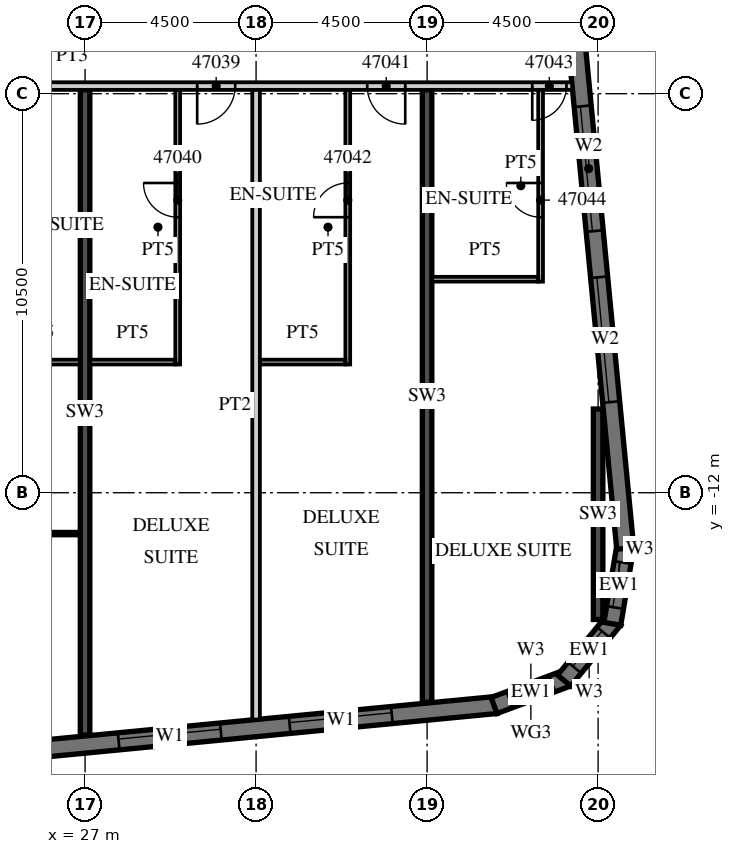
"""IFC4 building model, lengths in metres.
Left out: names, types, materials, properties, quantities, classifications, styles, units other than length and angle.
Written with IfcOpenShell. Run it as: python <this file> out.ifc"""

import sys

from ifc_helpers import new_model, si_unit, direction, frame, frame_2d, origin, place, context, subcontext, project, spatial, polyline, rectangle, outline, extrude, element, fill, save


model = new_model("IFC4")
c1 = context("Model", 3, precision=1e-05, world=origin(), true_north=direction((0.0, 1.0)))
c2 = subcontext(c1, "Body", "Model", "MODEL_VIEW")
j1 = project(units=[si_unit("LENGTHUNIT", "METRE"), si_unit("PLANEANGLEUNIT", "RADIAN")], contexts=[c1])
p1 = place(None, origin())
s1 = spatial("IfcSite", under=j1, at=p1, CompositionType="ELEMENT")
p2 = place(p1, origin())
s2 = spatial("IfcBuilding", under=s1, at=p2, CompositionType="ELEMENT")
p3 = place(p2, frame((0.0, 0.0, 196.6)))
s3 = spatial("IfcBuildingStorey", under=s2, at=p3, CompositionType="ELEMENT", Elevation=196.6)
p4 = place(p3, frame((27.0, -18.379, 0.0), z_axis=(0.0, 0.0, 1.0), x_axis=(0.0, 1.0, 0.0)))
e1 = element("IfcWall", 1, at=p4, inside=s3, PredefinedType="SHEAR", context=c2, shape_type="SweptSolid", body=[
    extrude(rectangle(XDim=16.979, YDim=0.25, at=frame_2d((8.489, 0.0))), origin(), (0.0, 0.0, 1.0), 3.3),
])
p5 = place(p3, frame((36.0, -17.512, 0.0), z_axis=(0.0, 0.0, 1.0), x_axis=(0.0, 1.0, 0.0)))
e2 = element("IfcWall", 2, at=p5, inside=s3, PredefinedType="SHEAR", context=c2, shape_type="SweptSolid", body=[
    extrude(rectangle(XDim=16.112, YDim=0.25, at=frame_2d((8.056, 0.0))), origin(), (0.0, 0.0, 1.0), 3.3),
])
p6 = place(p3, frame((40.5, -15.335, 0.0), z_axis=(0.0, 0.0, 1.0), x_axis=(0.0, 1.0, 0.0)))
e3 = element("IfcWall", 3, at=p6, inside=s3, PredefinedType="SHEAR", context=c2, shape_type="SweptSolid", body=[
    extrude(rectangle(XDim=5.538, YDim=0.25, at=frame_2d((2.769, 0.0))), origin(), (0.0, 0.0, 1.0), 3.3),
])
p7 = place(p3, frame((-13.521, -22.529, 0.0), z_axis=(0.0, 0.0, 1.0), x_axis=(0.995396436651, 0.095843277819, 0.0)))
e4 = element("IfcWall", 4, at=p7, inside=s3, PredefinedType="SOLIDWALL", context=c2, shape_type="SweptSolid", body=[
    extrude(rectangle(XDim=51.578, YDim=0.45, at=frame_2d((25.789, 0.0))), origin(), (0.0, 0.0, 1.0), 3.02),
])
p8 = place(p7, frame((0.91, 0.0, 0.45)))
e5 = element("IfcOpeningElement", 5, at=p8, cuts=e4, PredefinedType="OPENING", context=c2, shape_type="SweptSolid", body=[
    extrude(rectangle(XDim=2.7, YDim=2.25, at=frame_2d((1.35, 1.125))), frame((0.0, 0.235, 0.0), z_axis=(0.0, -1.0, 0.0), x_axis=(1.0, 0.0, 0.0)), (0.0, 0.0, 1.0), 0.47),
])
p9 = place(p7, frame((5.431, 0.0, 0.45)))
e6 = element("IfcOpeningElement", 6, at=p9, cuts=e4, PredefinedType="OPENING", context=c2, shape_type="SweptSolid", body=[
    extrude(rectangle(XDim=2.7, YDim=2.25, at=frame_2d((1.35, 1.125))), frame((0.0, 0.235, 0.0), z_axis=(0.0, -1.0, 0.0), x_axis=(1.0, 0.0, 0.0)), (0.0, 0.0, 1.0), 0.47),
])
p10 = place(p7, frame((9.952, 0.0, 0.45)))
e7 = element("IfcOpeningElement", 7, at=p10, cuts=e4, PredefinedType="OPENING", context=c2, shape_type="SweptSolid", body=[
    extrude(rectangle(XDim=2.7, YDim=2.25, at=frame_2d((1.35, 1.125))), frame((0.0, 0.235, 0.0), z_axis=(0.0, -1.0, 0.0), x_axis=(1.0, 0.0, 0.0)), (0.0, 0.0, 1.0), 0.47),
])
p11 = place(p7, frame((14.473, 0.0, 0.45)))
e8 = element("IfcOpeningElement", 8, at=p11, cuts=e4, PredefinedType="OPENING", context=c2, shape_type="SweptSolid", body=[
    extrude(rectangle(XDim=2.7, YDim=2.25, at=frame_2d((1.35, 1.125))), frame((0.0, 0.235, 0.0), z_axis=(0.0, -1.0, 0.0), x_axis=(1.0, 0.0, 0.0)), (0.0, 0.0, 1.0), 0.47),
])
p12 = place(p7, frame((18.994, 0.0, 0.45)))
e9 = element("IfcOpeningElement", 9, at=p12, cuts=e4, PredefinedType="OPENING", context=c2, shape_type="SweptSolid", body=[
    extrude(rectangle(XDim=2.7, YDim=2.25, at=frame_2d((1.35, 1.125))), frame((0.0, 0.235, 0.0), z_axis=(0.0, -1.0, 0.0), x_axis=(1.0, 0.0, 0.0)), (0.0, 0.0, 1.0), 0.47),
])
p13 = place(p7, frame((23.514, 0.0, 0.45)))
e10 = element("IfcOpeningElement", 10, at=p13, cuts=e4, PredefinedType="OPENING", context=c2, shape_type="SweptSolid", body=[
    extrude(rectangle(XDim=2.7, YDim=2.25, at=frame_2d((1.35, 1.125))), frame((0.0, 0.235, 0.0), z_axis=(0.0, -1.0, 0.0), x_axis=(1.0, 0.0, 0.0)), (0.0, 0.0, 1.0), 0.47),
])
p14 = place(p7, frame((28.035, 0.0, 0.45)))
e11 = element("IfcOpeningElement", 11, at=p14, cuts=e4, PredefinedType="OPENING", context=c2, shape_type="SweptSolid", body=[
    extrude(rectangle(XDim=2.7, YDim=2.25, at=frame_2d((1.35, 1.125))), frame((0.0, 0.235, 0.0), z_axis=(0.0, -1.0, 0.0), x_axis=(1.0, 0.0, 0.0)), (0.0, 0.0, 1.0), 0.47),
])
p15 = place(p7, frame((32.556, 0.0, 0.45)))
e12 = element("IfcOpeningElement", 12, at=p15, cuts=e4, PredefinedType="OPENING", context=c2, shape_type="SweptSolid", body=[
    extrude(rectangle(XDim=2.7, YDim=2.25, at=frame_2d((1.35, 1.125))), frame((0.0, 0.235, 0.0), z_axis=(0.0, -1.0, 0.0), x_axis=(1.0, 0.0, 0.0)), (0.0, 0.0, 1.0), 0.47),
])
p16 = place(p7, frame((37.077, 0.0, 0.45)))
e13 = element("IfcOpeningElement", 13, at=p16, cuts=e4, PredefinedType="OPENING", context=c2, shape_type="SweptSolid", body=[
    extrude(rectangle(XDim=2.7, YDim=2.25, at=frame_2d((1.35, 1.125))), frame((0.0, 0.235, 0.0), z_axis=(0.0, -1.0, 0.0), x_axis=(1.0, 0.0, 0.0)), (0.0, 0.0, 1.0), 0.47),
])
p17 = place(p7, frame((41.598, 0.0, 0.45)))
e14 = element("IfcOpeningElement", 14, at=p17, cuts=e4, PredefinedType="OPENING", context=c2, shape_type="SweptSolid", body=[
    extrude(rectangle(XDim=2.7, YDim=2.25, at=frame_2d((1.35, 1.125))), frame((0.0, 0.235, 0.0), z_axis=(0.0, -1.0, 0.0), x_axis=(1.0, 0.0, 0.0)), (0.0, 0.0, 1.0), 0.47),
])
p18 = place(p7, frame((46.119, 0.0, 0.45)))
e15 = element("IfcOpeningElement", 15, at=p18, cuts=e4, PredefinedType="OPENING", context=c2, shape_type="SweptSolid", body=[
    extrude(rectangle(XDim=2.7, YDim=2.25, at=frame_2d((1.35, 1.125))), frame((0.0, 0.235, 0.0), z_axis=(0.0, -1.0, 0.0), x_axis=(1.0, 0.0, 0.0)), (0.0, 0.0, 1.0), 0.47),
])
p19 = place(p3, frame((37.761, -17.598, 0.0), z_axis=(0.0, 0.0, 1.0), x_axis=(0.936677599948, 0.350192909346, 0.0)))
e16 = element("IfcWall", 16, at=p19, inside=s3, PredefinedType="SOLIDWALL", context=c2, shape_type="SweptSolid", body=[
    extrude(outline(polyline([(0.0, -0.225), (2.071, -0.225), (1.95, 0.225), (0.121, 0.225), (0.0, -0.225)])), origin(), (0.0, 0.0, 1.0), 3.02),
])
p20 = place(p19, frame((0.435, 0.0, 0.45)))
e17 = element("IfcOpeningElement", 17, at=p20, cuts=e16, PredefinedType="OPENING", context=c2, shape_type="SweptSolid", body=[
    extrude(rectangle(XDim=1.2, YDim=2.25, at=frame_2d((0.6, 1.125))), frame((0.0, 0.235, 0.0), z_axis=(0.0, -1.0, 0.0), x_axis=(1.0, 0.0, 0.0)), (0.0, 0.0, 1.0), 0.47),
])
p21 = place(p3, frame((39.606, -16.941, 0.0), z_axis=(0.0, 0.0, 1.0), x_axis=(0.636116318187, 0.771593176315, 0.0)))
e18 = element("IfcWall", 18, at=p21, inside=s3, PredefinedType="SOLIDWALL", context=c2, shape_type="SweptSolid", body=[
    extrude(outline(polyline([(0.0, -0.225), (2.071, -0.225), (1.95, 0.225), (0.121, 0.225), (0.0, -0.225)])), origin(), (0.0, 0.0, 1.0), 3.02),
])
p22 = place(p21, frame((0.435, 0.0, 0.45)))
e19 = element("IfcOpeningElement", 19, at=p22, cuts=e18, PredefinedType="OPENING", context=c2, shape_type="SweptSolid", body=[
    extrude(rectangle(XDim=1.2, YDim=2.25, at=frame_2d((0.6, 1.125))), frame((0.0, 0.235, 0.0), z_axis=(0.0, -1.0, 0.0), x_axis=(1.0, 0.0, 0.0)), (0.0, 0.0, 1.0), 0.47),
])
p23 = place(p3, frame((40.875, -15.449, 0.0), z_axis=(0.0, 0.0, 1.0), x_axis=(0.164953448126, 0.986301353518, 0.0)))
e20 = element("IfcWall", 20, at=p23, inside=s3, PredefinedType="SOLIDWALL", context=c2, shape_type="SweptSolid", body=[
    extrude(outline(polyline([(0.0, -0.225), (2.071, -0.225), (1.95, 0.225), (0.121, 0.225), (0.0, -0.225)])), origin(), (0.0, 0.0, 1.0), 3.02),
])
p24 = place(p23, frame((0.435, 0.0, 0.45)))
e21 = element("IfcOpeningElement", 21, at=p24, cuts=e20, PredefinedType="OPENING", context=c2, shape_type="SweptSolid", body=[
    extrude(rectangle(XDim=1.2, YDim=2.25, at=frame_2d((0.6, 1.125))), frame((0.0, 0.235, 0.0), z_axis=(0.0, -1.0, 0.0), x_axis=(1.0, 0.0, 0.0)), (0.0, 0.0, 1.0), 0.47),
])
p25 = place(p3, frame((41.214, -13.466, 0.0), z_axis=(0.0, 0.0, 1.0), x_axis=(-0.095847314626, 0.995396047952, 0.0)))
e22 = element("IfcWall", 22, at=p25, inside=s3, PredefinedType="SOLIDWALL", context=c2, shape_type="SweptSolid", body=[
    extrude(rectangle(XDim=34.0, YDim=0.45, at=frame_2d((17.0, 0.0))), origin(), (0.0, 0.0, 1.0), 3.02),
])
p26 = place(p25, frame((3.869, 0.0, 0.45)))
e23 = element("IfcOpeningElement", 23, at=p26, cuts=e22, PredefinedType="OPENING", context=c2, shape_type="SweptSolid", body=[
    extrude(rectangle(XDim=3.3, YDim=2.25, at=frame_2d((1.65, 1.125))), frame((0.0, 0.235, 0.0), z_axis=(0.0, -1.0, 0.0), x_axis=(1.0, 0.0, 0.0)), (0.0, 0.0, 1.0), 0.47),
])
p27 = place(p25, frame((8.39, 0.0, 0.45)))
e24 = element("IfcOpeningElement", 24, at=p27, cuts=e22, PredefinedType="OPENING", context=c2, shape_type="SweptSolid", body=[
    extrude(rectangle(XDim=3.3, YDim=2.25, at=frame_2d((1.65, 1.125))), frame((0.0, 0.235, 0.0), z_axis=(0.0, -1.0, 0.0), x_axis=(1.0, 0.0, 0.0)), (0.0, 0.0, 1.0), 0.47),
])
p28 = place(p3, frame((13.5, -1.3, 0.0), z_axis=(0.0, 0.0, 1.0), x_axis=(1.0, 0.0, 0.0)))
e25 = element("IfcWall", 25, at=p28, inside=s3, PredefinedType="PARTITIONING", context=c2, shape_type="SweptSolid", body=[
    extrude(rectangle(XDim=26.317, YDim=0.2, at=frame_2d((13.158, 0.0))), origin(), (0.0, 0.0, 1.0), 3.02),
])
p29 = place(p28, frame((0.575, 0.0, 0.0)))
e26 = element("IfcOpeningElement", 26, at=p29, cuts=e25, PredefinedType="OPENING", context=c2, shape_type="SweptSolid", body=[
    extrude(rectangle(XDim=1.0, YDim=2.1, at=frame_2d((0.5, 1.05))), frame((0.0, 0.11, 0.0), z_axis=(0.0, -1.0, 0.0), x_axis=(1.0, 0.0, 0.0)), (0.0, 0.0, 1.0), 0.22),
])
p30 = place(p28, frame((7.45, 0.0, 0.0)))
e27 = element("IfcOpeningElement", 27, at=p30, cuts=e25, PredefinedType="OPENING", context=c2, shape_type="SweptSolid", body=[
    extrude(rectangle(XDim=1.0, YDim=2.1, at=frame_2d((0.5, 1.05))), frame((0.0, 0.11, 0.0), z_axis=(0.0, -1.0, 0.0), x_axis=(1.0, 0.0, 0.0)), (0.0, 0.0, 1.0), 0.22),
])
p31 = place(p28, frame((9.55, 0.0, 0.0)))
e28 = element("IfcOpeningElement", 28, at=p31, cuts=e25, PredefinedType="OPENING", context=c2, shape_type="SweptSolid", body=[
    extrude(rectangle(XDim=1.0, YDim=2.1, at=frame_2d((0.5, 1.05))), frame((0.0, 0.11, 0.0), z_axis=(0.0, -1.0, 0.0), x_axis=(1.0, 0.0, 0.0)), (0.0, 0.0, 1.0), 0.22),
])
p32 = place(p28, frame((16.45, 0.0, 0.0)))
e29 = element("IfcOpeningElement", 29, at=p32, cuts=e25, PredefinedType="OPENING", context=c2, shape_type="SweptSolid", body=[
    extrude(rectangle(XDim=1.0, YDim=2.1, at=frame_2d((0.5, 1.05))), frame((0.0, 0.11, 0.0), z_axis=(0.0, -1.0, 0.0), x_axis=(1.0, 0.0, 0.0)), (0.0, 0.0, 1.0), 0.22),
])
p33 = place(p28, frame((20.925, 0.0, 0.0)))
e30 = element("IfcOpeningElement", 30, at=p33, cuts=e25, PredefinedType="OPENING", context=c2, shape_type="SweptSolid", body=[
    extrude(rectangle(XDim=1.0, YDim=2.1, at=frame_2d((0.5, 1.05))), frame((0.0, 0.11, 0.0), z_axis=(0.0, -1.0, 0.0), x_axis=(1.0, 0.0, 0.0)), (0.0, 0.0, 1.0), 0.22),
])
p34 = place(p28, frame((25.267, 0.0, 0.0)))
e31 = element("IfcOpeningElement", 31, at=p34, cuts=e25, PredefinedType="OPENING", context=c2, shape_type="SweptSolid", body=[
    extrude(rectangle(XDim=0.9, YDim=2.1, at=frame_2d((0.45, 1.05))), frame((0.0, 0.11, 0.0), z_axis=(0.0, -1.0, 0.0), x_axis=(1.0, 0.0, 0.0)), (0.0, 0.0, 1.0), 0.22),
])
p35 = place(p3, frame((24.625, -8.562, 0.0), z_axis=(0.0, 0.0, 1.0), x_axis=(1.0, 0.0, 0.0)))
e32 = element("IfcWall", 32, at=p35, inside=s3, PredefinedType="PARTITIONING", context=c2, shape_type="SweptSolid", body=[
    extrude(rectangle(XDim=2.25, YDim=0.125, at=frame_2d((1.125, 0.0))), origin(), (0.0, 0.0, 1.0), 3.02),
])
p36 = place(p3, frame((22.6, -13.075, 0.0), z_axis=(0.0, 0.0, 1.0), x_axis=(1.0, 0.0, 0.0)))
e33 = element("IfcWall", 33, at=p36, inside=s3, PredefinedType="PARTITIONING", context=c2, shape_type="SweptSolid", body=[
    extrude(rectangle(XDim=4.275, YDim=0.1, at=frame_2d((2.137, 0.0))), origin(), (0.0, 0.0, 1.0), 3.02),
])
p37 = place(p36, frame((1.988, 0.0, 0.0)))
e34 = element("IfcOpeningElement", 34, at=p37, cuts=e33, PredefinedType="OPENING", context=c2, shape_type="SweptSolid", body=[
    extrude(rectangle(XDim=1.5, YDim=2.1, at=frame_2d((0.75, 1.05))), frame((0.0, 0.06, 0.0), z_axis=(0.0, -1.0, 0.0), x_axis=(1.0, 0.0, 0.0)), (0.0, 0.0, 1.0), 0.12),
])
p38 = place(p3, frame((31.5, -17.967, 0.0), z_axis=(0.0, 0.0, 1.0), x_axis=(0.0, 1.0, 0.0)))
e35 = element("IfcWall", 35, at=p38, inside=s3, PredefinedType="PARTITIONING", context=c2, shape_type="SweptSolid", body=[
    extrude(rectangle(XDim=16.567, YDim=0.2, at=frame_2d((8.284, 0.0))), origin(), (0.0, 0.0, 1.0), 3.02),
])
p39 = place(p3, frame((29.438, -8.625, 0.0), z_axis=(0.0, 0.0, 1.0), x_axis=(0.0, 1.0, 0.0)))
e36 = element("IfcWall", 36, at=p39, inside=s3, PredefinedType="PARTITIONING", context=c2, shape_type="SweptSolid", body=[
    extrude(rectangle(XDim=7.225, YDim=0.125, at=frame_2d((3.613, 0.0))), origin(), (0.0, 0.0, 1.0), 3.02),
])
p40 = place(p39, frame((3.875, 0.0, 0.0)))
e37 = element("IfcOpeningElement", 37, at=p40, cuts=e36, PredefinedType="OPENING", context=c2, shape_type="SweptSolid", body=[
    extrude(rectangle(XDim=0.9, YDim=2.1, at=frame_2d((0.45, 1.05))), frame((0.0, 0.073, 0.0), z_axis=(0.0, -1.0, 0.0), x_axis=(1.0, 0.0, 0.0)), (0.0, 0.0, 1.0), 0.145),
])
p41 = place(p3, frame((27.125, -8.562, 0.0), z_axis=(0.0, 0.0, 1.0), x_axis=(1.0, 0.0, 0.0)))
e38 = element("IfcWall", 38, at=p41, inside=s3, PredefinedType="PARTITIONING", context=c2, shape_type="SweptSolid", body=[
    extrude(rectangle(XDim=2.25, YDim=0.125, at=frame_2d((1.125, 0.0))), origin(), (0.0, 0.0, 1.0), 3.02),
])
p42 = place(p3, frame((33.913, -8.625, 0.0), z_axis=(0.0, 0.0, 1.0), x_axis=(0.0, 1.0, 0.0)))
e39 = element("IfcWall", 39, at=p42, inside=s3, PredefinedType="PARTITIONING", context=c2, shape_type="SweptSolid", body=[
    extrude(rectangle(XDim=7.225, YDim=0.125, at=frame_2d((3.613, 0.0))), origin(), (0.0, 0.0, 1.0), 3.02),
])
p43 = place(p42, frame((3.875, 0.0, 0.0)))
e40 = element("IfcOpeningElement", 40, at=p43, cuts=e39, PredefinedType="OPENING", context=c2, shape_type="SweptSolid", body=[
    extrude(rectangle(XDim=0.9, YDim=2.1, at=frame_2d((0.45, 1.05))), frame((0.0, 0.073, 0.0), z_axis=(0.0, -1.0, 0.0), x_axis=(1.0, 0.0, 0.0)), (0.0, 0.0, 1.0), 0.145),
])
p44 = place(p3, frame((31.6, -8.562, 0.0), z_axis=(0.0, 0.0, 1.0), x_axis=(1.0, 0.0, 0.0)))
e41 = element("IfcWall", 41, at=p44, inside=s3, PredefinedType="PARTITIONING", context=c2, shape_type="SweptSolid", body=[
    extrude(rectangle(XDim=2.25, YDim=0.125, at=frame_2d((1.125, 0.0))), origin(), (0.0, 0.0, 1.0), 3.02),
])
p45 = place(p3, frame((38.987, -6.445, 0.0), z_axis=(0.0, 0.0, 1.0), x_axis=(0.0, 1.0, 0.0)))
e42 = element("IfcWall", 42, at=p45, inside=s3, PredefinedType="PARTITIONING", context=c2, shape_type="SweptSolid", body=[
    extrude(rectangle(XDim=5.045, YDim=0.125, at=frame_2d((2.522, 0.0))), origin(), (0.0, 0.0, 1.0), 3.02),
])
p46 = place(p45, frame((1.695, 0.0, 0.0)))
e43 = element("IfcOpeningElement", 43, at=p46, cuts=e42, PredefinedType="OPENING", context=c2, shape_type="SweptSolid", body=[
    extrude(rectangle(XDim=0.9, YDim=2.1, at=frame_2d((0.45, 1.05))), frame((0.0, 0.073, 0.0), z_axis=(0.0, -1.0, 0.0), x_axis=(1.0, 0.0, 0.0)), (0.0, 0.0, 1.0), 0.145),
])
p47 = place(p3, frame((36.125, -6.382, 0.0), z_axis=(0.0, 0.0, 1.0), x_axis=(1.0, 0.0, 0.0)))
e44 = element("IfcWall", 44, at=p47, inside=s3, PredefinedType="PARTITIONING", context=c2, shape_type="SweptSolid", body=[
    extrude(rectangle(XDim=2.8, YDim=0.125, at=frame_2d((1.4, 0.0))), origin(), (0.0, 0.0, 1.0), 3.02),
])
p48 = place(p17, origin())
e45 = element("IfcWindow", 45, at=p48, inside=s3, PartitioningType="SINGLE_PANEL", PredefinedType="WINDOW", context=c2, shape_type="SweptSolid", body=[
    extrude(rectangle(XDim=2.7, YDim=2.25, at=frame_2d((1.35, 1.125))), frame((0.0, 0.09, 0.0), z_axis=(0.0, -1.0, 0.0), x_axis=(1.0, 0.0, 0.0)), (0.0, 0.0, 1.0), 0.06),
])
fill(e14, e45)
p49 = place(p18, origin())
e46 = element("IfcWindow", 46, at=p49, inside=s3, PartitioningType="SINGLE_PANEL", PredefinedType="WINDOW", context=c2, shape_type="SweptSolid", body=[
    extrude(rectangle(XDim=2.7, YDim=2.25, at=frame_2d((1.35, 1.125))), frame((0.0, 0.09, 0.0), z_axis=(0.0, -1.0, 0.0), x_axis=(1.0, 0.0, 0.0)), (0.0, 0.0, 1.0), 0.06),
])
fill(e15, e46)
p50 = place(p20, origin())
e47 = element("IfcWindow", 47, at=p50, inside=s3, PartitioningType="SINGLE_PANEL", PredefinedType="WINDOW", context=c2, shape_type="SweptSolid", body=[
    extrude(rectangle(XDim=1.2, YDim=2.25, at=frame_2d((0.6, 1.125))), frame((0.0, 0.09, 0.0), z_axis=(0.0, -1.0, 0.0), x_axis=(1.0, 0.0, 0.0)), (0.0, 0.0, 1.0), 0.06),
])
fill(e17, e47)
p51 = place(p22, origin())
e48 = element("IfcWindow", 48, at=p51, inside=s3, PartitioningType="SINGLE_PANEL", PredefinedType="WINDOW", context=c2, shape_type="SweptSolid", body=[
    extrude(rectangle(XDim=1.2, YDim=2.25, at=frame_2d((0.6, 1.125))), frame((0.0, 0.09, 0.0), z_axis=(0.0, -1.0, 0.0), x_axis=(1.0, 0.0, 0.0)), (0.0, 0.0, 1.0), 0.06),
])
fill(e19, e48)
p52 = place(p24, origin())
e49 = element("IfcWindow", 49, at=p52, inside=s3, PartitioningType="SINGLE_PANEL", PredefinedType="WINDOW", context=c2, shape_type="SweptSolid", body=[
    extrude(rectangle(XDim=1.2, YDim=2.25, at=frame_2d((0.6, 1.125))), frame((0.0, 0.09, 0.0), z_axis=(0.0, -1.0, 0.0), x_axis=(1.0, 0.0, 0.0)), (0.0, 0.0, 1.0), 0.06),
])
fill(e21, e49)
p53 = place(p26, origin())
e50 = element("IfcWindow", 50, at=p53, inside=s3, PartitioningType="SINGLE_PANEL", PredefinedType="WINDOW", context=c2, shape_type="SweptSolid", body=[
    extrude(rectangle(XDim=3.3, YDim=2.25, at=frame_2d((1.65, 1.125))), frame((0.0, 0.09, 0.0), z_axis=(0.0, -1.0, 0.0), x_axis=(1.0, 0.0, 0.0)), (0.0, 0.0, 1.0), 0.06),
])
fill(e23, e50)
p54 = place(p27, origin())
e51 = element("IfcWindow", 51, at=p54, inside=s3, PartitioningType="SINGLE_PANEL", PredefinedType="WINDOW", context=c2, shape_type="SweptSolid", body=[
    extrude(rectangle(XDim=3.3, YDim=2.25, at=frame_2d((1.65, 1.125))), frame((0.0, 0.09, 0.0), z_axis=(0.0, -1.0, 0.0), x_axis=(1.0, 0.0, 0.0)), (0.0, 0.0, 1.0), 0.06),
])
fill(e24, e51)
p55 = place(p32, origin())
e52 = element("IfcDoor", 52, at=p55, inside=s3, OperationType="SINGLE_SWING_LEFT", PredefinedType="DOOR", context=c2, shape_type="SweptSolid", body=[
    extrude(rectangle(XDim=1.0, YDim=2.1, at=frame_2d((0.5, 1.05))), frame((0.0, 0.025, 0.0), z_axis=(0.0, -1.0, 0.0), x_axis=(1.0, 0.0, 0.0)), (0.0, 0.0, 1.0), 0.05),
])
fill(e29, e52)
p56 = place(p40, origin())
e53 = element("IfcDoor", 53, at=p56, inside=s3, OperationType="SINGLE_SWING_RIGHT", PredefinedType="DOOR", context=c2, shape_type="SweptSolid", body=[
    extrude(rectangle(XDim=0.9, YDim=2.1, at=frame_2d((0.45, 1.05))), frame((0.0, 0.025, 0.0), z_axis=(0.0, -1.0, 0.0), x_axis=(1.0, 0.0, 0.0)), (0.0, 0.0, 1.0), 0.05),
])
fill(e37, e53)
p57 = place(p33, origin())
e54 = element("IfcDoor", 54, at=p57, inside=s3, OperationType="SINGLE_SWING_RIGHT", PredefinedType="DOOR", context=c2, shape_type="SweptSolid", body=[
    extrude(rectangle(XDim=1.0, YDim=2.1, at=frame_2d((0.5, 1.05))), frame((0.0, 0.025, 0.0), z_axis=(0.0, -1.0, 0.0), x_axis=(1.0, 0.0, 0.0)), (0.0, 0.0, 1.0), 0.05),
])
fill(e30, e54)
p58 = place(p43, origin())
e55 = element("IfcDoor", 55, at=p58, inside=s3, OperationType="SINGLE_SWING_LEFT", PredefinedType="DOOR", context=c2, shape_type="SweptSolid", body=[
    extrude(rectangle(XDim=0.9, YDim=2.1, at=frame_2d((0.45, 1.05))), frame((0.0, 0.025, 0.0), z_axis=(0.0, -1.0, 0.0), x_axis=(1.0, 0.0, 0.0)), (0.0, 0.0, 1.0), 0.05),
])
fill(e40, e55)
p59 = place(p34, origin())
e56 = element("IfcDoor", 56, at=p59, inside=s3, OperationType="SINGLE_SWING_LEFT", PredefinedType="DOOR", context=c2, shape_type="SweptSolid", body=[
    extrude(rectangle(XDim=0.9, YDim=2.1, at=frame_2d((0.45, 1.05))), frame((0.0, 0.025, 0.0), z_axis=(0.0, -1.0, 0.0), x_axis=(1.0, 0.0, 0.0)), (0.0, 0.0, 1.0), 0.05),
])
fill(e31, e56)
p60 = place(p46, origin())
e57 = element("IfcDoor", 57, at=p60, inside=s3, OperationType="SINGLE_SWING_RIGHT", PredefinedType="DOOR", context=c2, shape_type="SweptSolid", body=[
    extrude(rectangle(XDim=0.9, YDim=2.1, at=frame_2d((0.45, 1.05))), frame((0.0, 0.025, 0.0), z_axis=(0.0, -1.0, 0.0), x_axis=(1.0, 0.0, 0.0)), (0.0, 0.0, 1.0), 0.05),
])
fill(e43, e57)
save(model, sys.argv[1])
